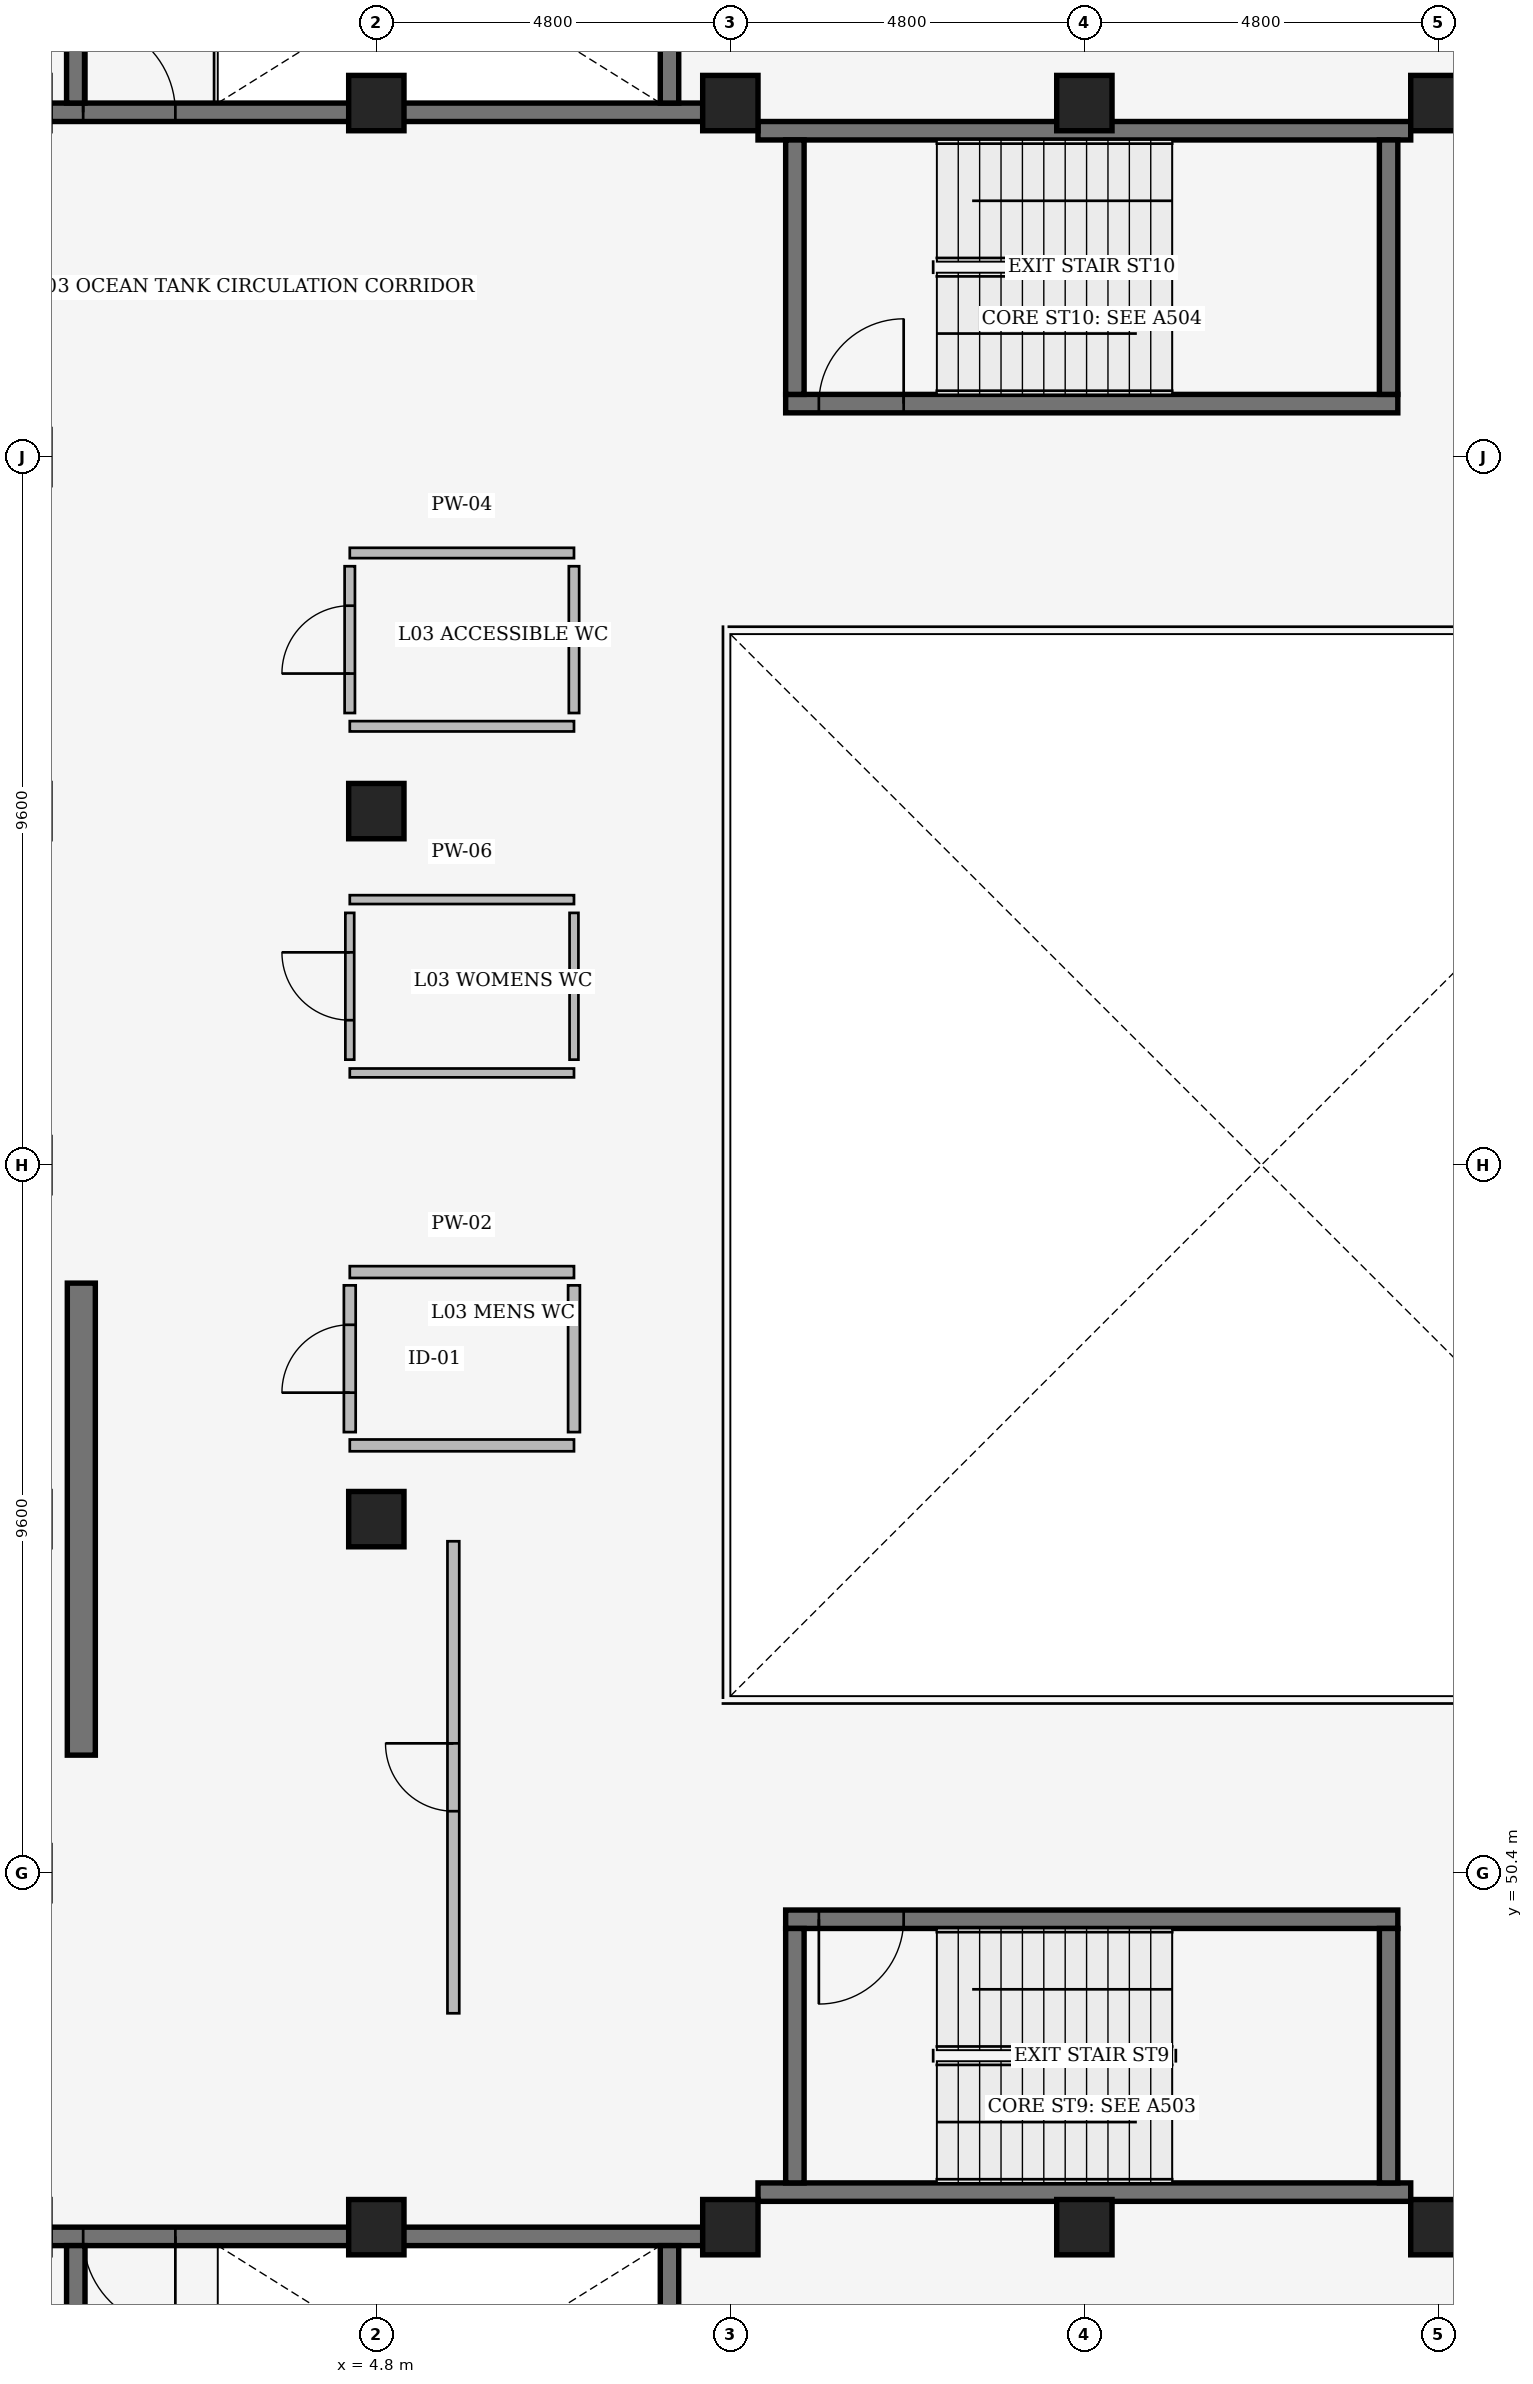
"""IFC4 building model, lengths in metres.
Left out: names, types, materials, properties, quantities, classifications, styles, units other than length and angle.
Written with IfcOpenShell. Run it as: python <this file> out.ifc"""

import sys

from ifc_helpers import new_model, si_unit, direction, frame, frame_2d, origin, origin_2d, place, context, subcontext, project, spatial, rectangle, extrude, element, fill, save


model = new_model("IFC4")
c1 = context("Model", 3, precision=1e-05, world=origin(), true_north=direction((0.0, 1.0)))
c2 = subcontext(c1, "Body", "Model", "MODEL_VIEW")
j1 = project(units=[si_unit("LENGTHUNIT", "METRE"), si_unit("PLANEANGLEUNIT", "RADIAN")], contexts=[c1])
p1 = place(None, origin())
s1 = spatial("IfcSite", under=j1, at=p1, CompositionType="ELEMENT")
p2 = place(p1, origin())
s2 = spatial("IfcBuilding", under=s1, at=p2, CompositionType="ELEMENT")
p3 = place(p2, frame((0.0, 0.0, 15.3)))
s3 = spatial("IfcBuildingStorey", under=s2, at=p3, CompositionType="ELEMENT", Elevation=15.3)
for number, where, z_axis, x_axis in (
    (1, (4.8, 45.6, 0.0), (0.0, 0.0, 1.0), (1.0, 0.0, 0.0)),
    (2, (4.8, 55.2, 0.0), (0.0, 0.0, 1.0), (1.0, 0.0, 0.0)),
    (3, (4.8, 64.8, 0.0), (0.0, 0.0, 1.0), (1.0, 0.0, 0.0)),
    (4, (4.8, 74.4, 0.0), (0.0, 0.0, 1.0), (1.0, 0.0, 0.0)),
    (5, (9.6, 45.6, 0.0), (0.0, 0.0, 1.0), (1.0, 0.0, 0.0)),
    (6, (9.6, 74.4, 0.0), (0.0, 0.0, 1.0), (1.0, 0.0, 0.0)),
    (7, (14.4, 45.6, 0.0), (0.0, 0.0, 1.0), (1.0, 0.0, 0.0)),
    (8, (14.4, 74.4, 0.0), (0.0, 0.0, 1.0), (1.0, 0.0, 0.0)),
    (9, (19.2, 45.6, 0.0), (0.0, 0.0, 1.0), (1.0, 0.0, 0.0)),
    (10, (19.2, 74.4, 0.0), (0.0, 0.0, 1.0), (1.0, 0.0, 0.0)),
):
    element("IfcColumn", number, at=place(p3, frame(where, z_axis=z_axis, x_axis=x_axis)), inside=s3, PredefinedType="COLUMN", context=c2, shape_type="SweptSolid", body=[
        extrude(rectangle(XDim=0.75, YDim=0.75, at=origin_2d()), origin(), (0.0, 0.0, 1.0), 4.5),
    ])
p4 = place(p3, frame((0.8, 52.0, 0.0), z_axis=(0.0, 0.0, 1.0), x_axis=(0.0, 1.0, 0.0)))
e11 = element("IfcWall", 11, at=p4, inside=s3, PredefinedType="SHEAR", context=c2, shape_type="SweptSolid", body=[
    extrude(rectangle(XDim=6.4, YDim=0.38, at=frame_2d((3.2, 0.0))), origin(), (0.0, 0.0, 1.0), 4.5),
])
p5 = place(p3, frame((9.225, 45.475, 0.0), z_axis=(0.0, 0.0, 1.0), x_axis=(-1.0, 0.0, 0.0)))
e12 = element("IfcWall", 12, at=p5, inside=s3, PredefinedType="SHEAR", context=c2, shape_type="SweptSolid", body=[
    extrude(rectangle(XDim=8.85, YDim=0.25, at=frame_2d((4.425, 0.0))), origin(), (0.0, 0.0, 1.0), 4.5),
])
p6 = place(p5, frame((8.4, 0.0, 0.0), z_axis=(0.0, 0.0, 1.0), x_axis=(-1.0, 0.0, 0.0)))
e13 = element("IfcOpeningElement", 13, at=p6, cuts=e12, PredefinedType="OPENING", context=c2, shape_type="SweptSolid", body=[
    extrude(rectangle(XDim=1.25, YDim=2.2, at=frame_2d((0.625, 1.1))), frame((0.0, 0.135, 0.0), z_axis=(0.0, -1.0, 0.0), x_axis=(1.0, 0.0, 0.0)), (0.0, 0.0, 1.0), 0.27),
])
for number, where, z_axis, x_axis in (
    (14, (0.725, 45.35, 0.0), (0.0, 0.0, 1.0), (0.0, -1.0, 0.0)),
    (15, (8.775, 41.6, 0.0), (0.0, 0.0, 1.0), (0.0, 1.0, 0.0)),
):
    element("IfcWall", number, at=place(p3, frame(where, z_axis=z_axis, x_axis=x_axis)), inside=s3, PredefinedType="SHEAR", context=c2, shape_type="SweptSolid", body=[
        extrude(rectangle(XDim=3.75, YDim=0.25, at=frame_2d((1.875, 0.0))), origin(), (0.0, 0.0, 1.0), 4.5),
    ])
p7 = place(p3, frame((0.375, 74.275, 0.0), z_axis=(0.0, 0.0, 1.0), x_axis=(1.0, 0.0, 0.0)))
e16 = element("IfcWall", 16, at=p7, inside=s3, PredefinedType="SHEAR", context=c2, shape_type="SweptSolid", body=[
    extrude(rectangle(XDim=8.85, YDim=0.25, at=frame_2d((4.425, 0.0))), origin(), (0.0, 0.0, 1.0), 4.5),
])
p8 = place(p7, frame((1.7, 0.0, 0.0), z_axis=(0.0, 0.0, 1.0), x_axis=(-1.0, 0.0, 0.0)))
e17 = element("IfcOpeningElement", 17, at=p8, cuts=e16, PredefinedType="OPENING", context=c2, shape_type="SweptSolid", body=[
    extrude(rectangle(XDim=1.25, YDim=2.2, at=frame_2d((0.625, 1.1))), frame((0.0, 0.135, 0.0), z_axis=(0.0, -1.0, 0.0), x_axis=(1.0, 0.0, 0.0)), (0.0, 0.0, 1.0), 0.27),
])
for number, where, z_axis, x_axis in (
    (18, (0.725, 78.15, 0.0), (0.0, 0.0, 1.0), (0.0, -1.0, 0.0)),
    (19, (8.775, 74.4, 0.0), (0.0, 0.0, 1.0), (0.0, 1.0, 0.0)),
):
    element("IfcWall", number, at=place(p3, frame(where, z_axis=z_axis, x_axis=x_axis)), inside=s3, PredefinedType="SHEAR", context=c2, shape_type="SweptSolid", body=[
        extrude(rectangle(XDim=3.75, YDim=0.25, at=frame_2d((1.875, 0.0))), origin(), (0.0, 0.0, 1.0), 4.5),
    ])
p9 = place(p3, frame((9.975, 46.075, 0.0), z_axis=(0.0, 0.0, 1.0), x_axis=(1.0, 0.0, 0.0)))
e20 = element("IfcWall", 20, at=p9, inside=s3, PredefinedType="SHEAR", context=c2, shape_type="SweptSolid", body=[
    extrude(rectangle(XDim=8.85, YDim=0.25, at=frame_2d((4.425, 0.0))), origin(), (0.0, 0.0, 1.0), 4.22),
])
p10 = place(p3, frame((18.65, 49.775, 0.0), z_axis=(0.0, 0.0, 1.0), x_axis=(-1.0, 0.0, 0.0)))
e21 = element("IfcWall", 21, at=p10, inside=s3, PredefinedType="SHEAR", context=c2, shape_type="SweptSolid", body=[
    extrude(rectangle(XDim=8.3, YDim=0.25, at=frame_2d((4.15, 0.0))), origin(), (0.0, 0.0, 1.0), 4.22),
])
p11 = place(p10, frame((7.85, 0.0, 0.0), z_axis=(0.0, 0.0, 1.0), x_axis=(-1.0, 0.0, 0.0)))
e22 = element("IfcOpeningElement", 22, at=p11, cuts=e21, PredefinedType="OPENING", context=c2, shape_type="SweptSolid", body=[
    extrude(rectangle(XDim=1.15, YDim=2.2, at=frame_2d((0.575, 1.1))), frame((0.0, 0.135, 0.0), z_axis=(0.0, -1.0, 0.0), x_axis=(1.0, 0.0, 0.0)), (0.0, 0.0, 1.0), 0.27),
])
for number, where, z_axis, x_axis in (
    (23, (10.475, 49.65, 0.0), (0.0, 0.0, 1.0), (0.0, -1.0, 0.0)),
    (24, (18.525, 46.2, 0.0), (0.0, 0.0, 1.0), (0.0, 1.0, 0.0)),
):
    element("IfcWall", number, at=place(p3, frame(where, z_axis=z_axis, x_axis=x_axis)), inside=s3, PredefinedType="SHEAR", context=c2, shape_type="SweptSolid", body=[
        extrude(rectangle(XDim=3.45, YDim=0.25, at=frame_2d((1.725, 0.0))), origin(), (0.0, 0.0, 1.0), 4.22),
    ])
p12 = place(p3, frame((10.35, 70.325, 0.0), z_axis=(0.0, 0.0, 1.0), x_axis=(1.0, 0.0, 0.0)))
e25 = element("IfcWall", 25, at=p12, inside=s3, PredefinedType="SHEAR", context=c2, shape_type="SweptSolid", body=[
    extrude(rectangle(XDim=8.3, YDim=0.25, at=frame_2d((4.15, 0.0))), origin(), (0.0, 0.0, 1.0), 4.22),
])
p13 = place(p12, frame((1.6, 0.0, 0.0), z_axis=(0.0, 0.0, 1.0), x_axis=(-1.0, 0.0, 0.0)))
e26 = element("IfcOpeningElement", 26, at=p13, cuts=e25, PredefinedType="OPENING", context=c2, shape_type="SweptSolid", body=[
    extrude(rectangle(XDim=1.15, YDim=2.2, at=frame_2d((0.575, 1.1))), frame((0.0, 0.135, 0.0), z_axis=(0.0, -1.0, 0.0), x_axis=(1.0, 0.0, 0.0)), (0.0, 0.0, 1.0), 0.27),
])
p14 = place(p3, frame((18.825, 74.025, 0.0), z_axis=(0.0, 0.0, 1.0), x_axis=(-1.0, 0.0, 0.0)))
e27 = element("IfcWall", 27, at=p14, inside=s3, PredefinedType="SHEAR", context=c2, shape_type="SweptSolid", body=[
    extrude(rectangle(XDim=8.85, YDim=0.25, at=frame_2d((4.425, 0.0))), origin(), (0.0, 0.0, 1.0), 4.22),
])
for number, where, z_axis, x_axis in (
    (28, (10.475, 73.9, 0.0), (0.0, 0.0, 1.0), (0.0, -1.0, 0.0)),
    (29, (18.525, 70.45, 0.0), (0.0, 0.0, 1.0), (0.0, 1.0, 0.0)),
):
    element("IfcWall", number, at=place(p3, frame(where, z_axis=z_axis, x_axis=x_axis)), inside=s3, PredefinedType="SHEAR", context=c2, shape_type="SweptSolid", body=[
        extrude(rectangle(XDim=3.45, YDim=0.25, at=frame_2d((1.725, 0.0))), origin(), (0.0, 0.0, 1.0), 4.22),
    ])
for number, where, z_axis, x_axis in (
    (30, (4.44, 58.55, 0.0), (0.0, 0.0, 1.0), (1.0, 0.0, 0.0)),
    (31, (4.44, 56.2, 0.0), (0.0, 0.0, 1.0), (1.0, 0.0, 0.0)),
):
    element("IfcWall", number, at=place(p3, frame(where, z_axis=z_axis, x_axis=x_axis)), inside=s3, PredefinedType="PARTITIONING", context=c2, shape_type="SweptSolid", body=[
        extrude(rectangle(XDim=3.04, YDim=0.16, at=frame_2d((1.52, 0.0))), origin(), (0.0, 0.0, 1.0), 3.575),
    ])
p15 = place(p3, frame((4.44, 56.38, 0.0), z_axis=(0.0, 0.0, 1.0), x_axis=(0.0, 1.0, 0.0)))
e32 = element("IfcWall", 32, at=p15, inside=s3, PredefinedType="PARTITIONING", context=c2, shape_type="SweptSolid", body=[
    extrude(rectangle(XDim=1.99, YDim=0.16, at=frame_2d((0.995, 0.0))), origin(), (0.0, 0.0, 1.0), 3.575),
])
p16 = place(p15, frame((0.535, 0.0, 0.0)))
e33 = element("IfcOpeningElement", 33, at=p16, cuts=e32, PredefinedType="OPENING", context=c2, shape_type="SweptSolid", body=[
    extrude(rectangle(XDim=0.92, YDim=2.12, at=frame_2d((0.46, 1.06))), frame((0.0, 0.09, 0.0), z_axis=(0.0, -1.0, 0.0), x_axis=(1.0, 0.0, 0.0)), (0.0, 0.0, 1.0), 0.18),
])
p17 = place(p3, frame((7.48, 56.38, 0.0), z_axis=(0.0, 0.0, 1.0), x_axis=(0.0, 1.0, 0.0)))
e34 = element("IfcWall", 34, at=p17, inside=s3, PredefinedType="PARTITIONING", context=c2, shape_type="SweptSolid", body=[
    extrude(rectangle(XDim=1.99, YDim=0.16, at=frame_2d((0.995, 0.0))), origin(), (0.0, 0.0, 1.0), 4.14),
])
for number, where, z_axis, x_axis in (
    (35, (4.44, 63.6, 0.0), (0.0, 0.0, 1.0), (1.0, 0.0, 0.0)),
    (36, (4.44, 61.25, 0.0), (0.0, 0.0, 1.0), (1.0, 0.0, 0.0)),
):
    element("IfcWall", number, at=place(p3, frame(where, z_axis=z_axis, x_axis=x_axis)), inside=s3, PredefinedType="PARTITIONING", context=c2, shape_type="SweptSolid", body=[
        extrude(rectangle(XDim=3.04, YDim=0.12, at=frame_2d((1.52, 0.0))), origin(), (0.0, 0.0, 1.0), 3.575),
    ])
p18 = place(p3, frame((4.44, 61.43, 0.0), z_axis=(0.0, 0.0, 1.0), x_axis=(0.0, 1.0, 0.0)))
e37 = element("IfcWall", 37, at=p18, inside=s3, PredefinedType="PARTITIONING", context=c2, shape_type="SweptSolid", body=[
    extrude(rectangle(XDim=1.99, YDim=0.12, at=frame_2d((0.995, 0.0))), origin(), (0.0, 0.0, 1.0), 3.575),
])
p19 = place(p18, frame((0.535, 0.0, 0.0)))
e38 = element("IfcOpeningElement", 38, at=p19, cuts=e37, PredefinedType="OPENING", context=c2, shape_type="SweptSolid", body=[
    extrude(rectangle(XDim=0.92, YDim=2.12, at=frame_2d((0.46, 1.06))), frame((0.0, 0.07, 0.0), z_axis=(0.0, -1.0, 0.0), x_axis=(1.0, 0.0, 0.0)), (0.0, 0.0, 1.0), 0.14),
])
p20 = place(p3, frame((7.48, 61.43, 0.0), z_axis=(0.0, 0.0, 1.0), x_axis=(0.0, 1.0, 0.0)))
e39 = element("IfcWall", 39, at=p20, inside=s3, PredefinedType="PARTITIONING", context=c2, shape_type="SweptSolid", body=[
    extrude(rectangle(XDim=1.99, YDim=0.12, at=frame_2d((0.995, 0.0))), origin(), (0.0, 0.0, 1.0), 4.14),
])
for number, where, z_axis, x_axis in (
    (40, (4.44, 68.3, 0.0), (0.0, 0.0, 1.0), (1.0, 0.0, 0.0)),
    (41, (4.44, 65.95, 0.0), (0.0, 0.0, 1.0), (1.0, 0.0, 0.0)),
):
    element("IfcWall", number, at=place(p3, frame(where, z_axis=z_axis, x_axis=x_axis)), inside=s3, PredefinedType="PARTITIONING", context=c2, shape_type="SweptSolid", body=[
        extrude(rectangle(XDim=3.04, YDim=0.14, at=frame_2d((1.52, 0.0))), origin(), (0.0, 0.0, 1.0), 3.642),
    ])
p21 = place(p3, frame((4.44, 66.13, 0.0), z_axis=(0.0, 0.0, 1.0), x_axis=(0.0, 1.0, 0.0)))
e42 = element("IfcWall", 42, at=p21, inside=s3, PredefinedType="PARTITIONING", context=c2, shape_type="SweptSolid", body=[
    extrude(rectangle(XDim=1.99, YDim=0.14, at=frame_2d((0.995, 0.0))), origin(), (0.0, 0.0, 1.0), 3.642),
])
p22 = place(p21, frame((0.535, 0.0, 0.0)))
e43 = element("IfcOpeningElement", 43, at=p22, cuts=e42, PredefinedType="OPENING", context=c2, shape_type="SweptSolid", body=[
    extrude(rectangle(XDim=0.92, YDim=2.12, at=frame_2d((0.46, 1.06))), frame((0.0, 0.08, 0.0), z_axis=(0.0, -1.0, 0.0), x_axis=(1.0, 0.0, 0.0)), (0.0, 0.0, 1.0), 0.16),
])
p23 = place(p3, frame((7.48, 66.13, 0.0), z_axis=(0.0, 0.0, 1.0), x_axis=(0.0, 1.0, 0.0)))
e44 = element("IfcWall", 44, at=p23, inside=s3, PredefinedType="PARTITIONING", context=c2, shape_type="SweptSolid", body=[
    extrude(rectangle(XDim=1.99, YDim=0.14, at=frame_2d((0.995, 0.0))), origin(), (0.0, 0.0, 1.0), 4.14),
])
p24 = place(p3, frame((5.844, 48.5, 0.0), z_axis=(0.0, 0.0, 1.0), x_axis=(0.0, 1.0, 0.0)))
e45 = element("IfcWall", 45, at=p24, inside=s3, PredefinedType="PARTITIONING", context=c2, shape_type="SweptSolid", body=[
    extrude(rectangle(XDim=6.4, YDim=0.16, at=frame_2d((3.2, 0.0))), origin(), (0.0, 0.0, 1.0), 4.14),
])
p25 = place(p24, frame((2.74, 0.0, 0.0)))
e46 = element("IfcOpeningElement", 46, at=p25, cuts=e45, PredefinedType="OPENING", context=c2, shape_type="SweptSolid", body=[
    extrude(rectangle(XDim=0.92, YDim=2.12, at=frame_2d((0.46, 1.06))), frame((0.0, 0.09, 0.0), z_axis=(0.0, -1.0, 0.0), x_axis=(1.0, 0.0, 0.0)), (0.0, 0.0, 1.0), 0.18),
])
p26 = place(p6, origin())
e47 = element("IfcDoor", 47, at=p26, inside=s3, OperationType="SINGLE_SWING_RIGHT", PredefinedType="DOOR", context=c2, shape_type="SweptSolid", body=[
    extrude(rectangle(XDim=1.25, YDim=2.2, at=frame_2d((0.625, 1.1))), frame((0.0, 0.025, 0.0), z_axis=(0.0, -1.0, 0.0), x_axis=(1.0, 0.0, 0.0)), (0.0, 0.0, 1.0), 0.05),
])
fill(e13, e47)
p27 = place(p8, origin())
e48 = element("IfcDoor", 48, at=p27, inside=s3, OperationType="SINGLE_SWING_RIGHT", PredefinedType="DOOR", context=c2, shape_type="SweptSolid", body=[
    extrude(rectangle(XDim=1.25, YDim=2.2, at=frame_2d((0.625, 1.1))), frame((0.0, 0.025, 0.0), z_axis=(0.0, -1.0, 0.0), x_axis=(1.0, 0.0, 0.0)), (0.0, 0.0, 1.0), 0.05),
])
fill(e17, e48)
p28 = place(p11, origin())
e49 = element("IfcDoor", 49, at=p28, inside=s3, OperationType="SINGLE_SWING_LEFT", PredefinedType="DOOR", context=c2, shape_type="SweptSolid", body=[
    extrude(rectangle(XDim=1.15, YDim=2.2, at=frame_2d((0.575, 1.1))), frame((0.0, 0.025, 0.0), z_axis=(0.0, -1.0, 0.0), x_axis=(1.0, 0.0, 0.0)), (0.0, 0.0, 1.0), 0.05),
])
fill(e22, e49)
p29 = place(p13, origin())
e50 = element("IfcDoor", 50, at=p29, inside=s3, OperationType="SINGLE_SWING_LEFT", PredefinedType="DOOR", context=c2, shape_type="SweptSolid", body=[
    extrude(rectangle(XDim=1.15, YDim=2.2, at=frame_2d((0.575, 1.1))), frame((0.0, 0.025, 0.0), z_axis=(0.0, -1.0, 0.0), x_axis=(1.0, 0.0, 0.0)), (0.0, 0.0, 1.0), 0.05),
])
fill(e26, e50)
p30 = place(p16, origin())
e51 = element("IfcDoor", 51, at=p30, inside=s3, OperationType="SINGLE_SWING_LEFT", PredefinedType="DOOR", context=c2, shape_type="SweptSolid", body=[
    extrude(rectangle(XDim=0.92, YDim=2.12, at=frame_2d((0.46, 1.06))), frame((0.0, 0.025, 0.0), z_axis=(0.0, -1.0, 0.0), x_axis=(1.0, 0.0, 0.0)), (0.0, 0.0, 1.0), 0.05),
])
fill(e33, e51)
p31 = place(p19, origin())
e52 = element("IfcDoor", 52, at=p31, inside=s3, OperationType="SINGLE_SWING_RIGHT", PredefinedType="DOOR", context=c2, shape_type="SweptSolid", body=[
    extrude(rectangle(XDim=0.92, YDim=2.12, at=frame_2d((0.46, 1.06))), frame((0.0, 0.025, 0.0), z_axis=(0.0, -1.0, 0.0), x_axis=(1.0, 0.0, 0.0)), (0.0, 0.0, 1.0), 0.05),
])
fill(e38, e52)
p32 = place(p22, origin())
e53 = element("IfcDoor", 53, at=p32, inside=s3, OperationType="SINGLE_SWING_LEFT", PredefinedType="DOOR", context=c2, shape_type="SweptSolid", body=[
    extrude(rectangle(XDim=0.92, YDim=2.12, at=frame_2d((0.46, 1.06))), frame((0.0, 0.025, 0.0), z_axis=(0.0, -1.0, 0.0), x_axis=(1.0, 0.0, 0.0)), (0.0, 0.0, 1.0), 0.05),
])
fill(e43, e53)
p33 = place(p25, origin())
e54 = element("IfcDoor", 54, at=p33, inside=s3, OperationType="SINGLE_SWING_RIGHT", PredefinedType="DOOR", context=c2, shape_type="SweptSolid", body=[
    extrude(rectangle(XDim=0.92, YDim=2.12, at=frame_2d((0.46, 1.06))), frame((0.0, 0.025, 0.0), z_axis=(0.0, -1.0, 0.0), x_axis=(1.0, 0.0, 0.0)), (0.0, 0.0, 1.0), 0.05),
])
fill(e46, e54)
save(model, sys.argv[1])
